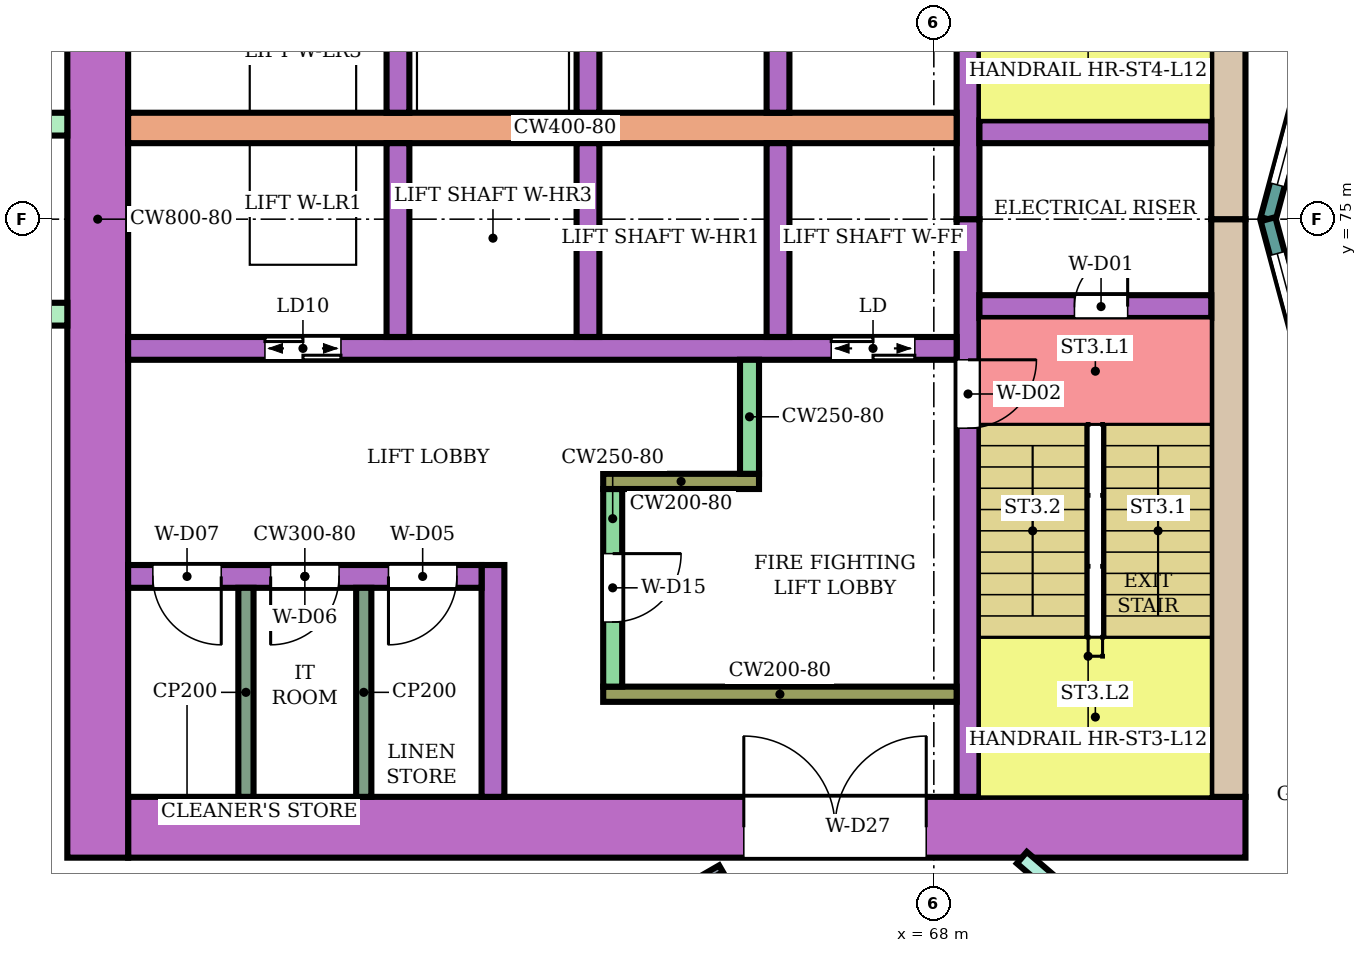
"""IFC4 building model, lengths in metres.
Left out: names, types, materials, properties, quantities, classifications, styles, units other than length and angle.
Written with IfcOpenShell. Run it as: python <this file> out.ifc"""

import sys

from ifc_helpers import new_model, si_unit, direction, frame, frame_2d, origin, place, context, subcontext, project, spatial, rectangle, extrude, element, fill, save


model = new_model("IFC4")
c1 = context("Model", 3, precision=1e-05, world=origin(), true_north=direction((0.0, 1.0)))
c2 = subcontext(c1, "Body", "Model", "MODEL_VIEW")
j1 = project(units=[si_unit("LENGTHUNIT", "METRE"), si_unit("PLANEANGLEUNIT", "RADIAN")], contexts=[c1])
p1 = place(None, origin())
s1 = spatial("IfcSite", under=j1, at=p1, CompositionType="ELEMENT")
p2 = place(p1, origin())
s2 = spatial("IfcBuilding", under=s1, at=p2, CompositionType="ELEMENT")
p3 = place(p2, frame((0.0, 0.0, 55.4)))
s3 = spatial("IfcBuildingStorey", under=s2, at=p3, CompositionType="ELEMENT", Elevation=55.4)
p4 = place(p3, frame((72.1, 67.0, 0.0), z_axis=(0.0, 0.0, 1.0), x_axis=(-1.0, 0.0, 0.0)))
e1 = element("IfcWall", 1, at=p4, inside=s3, PredefinedType="SHEAR", context=c2, shape_type="SweptSolid", body=[
    extrude(rectangle(XDim=14.7, YDim=0.8, at=frame_2d((7.35, 0.0))), origin(), (0.0, 0.0, 1.0), 3.48),
])
p5 = place(p4, frame((4.2, 0.0, 0.0)))
e2 = element("IfcOpeningElement", 2, at=p5, cuts=e1, PredefinedType="OPENING", context=c2, shape_type="SweptSolid", body=[
    extrude(rectangle(XDim=2.4, YDim=2.4, at=frame_2d((1.2, 1.2))), frame((0.0, 0.41, 0.0), z_axis=(0.0, -1.0, 0.0), x_axis=(1.0, 0.0, 0.0)), (0.0, 0.0, 1.0), 0.82),
])
for number, where, z_axis, x_axis in (
    (3, (71.875, 75.0, 0.0), (0.0, 0.0, 1.0), (0.0, -1.0, 0.0)),
    (4, (71.875, 82.6, 0.0), (0.0, 0.0, 1.0), (0.0, -1.0, 0.0)),
):
    element("IfcWall", number, at=place(p3, frame(where, z_axis=z_axis, x_axis=x_axis)), inside=s3, PredefinedType="SHEAR", context=c2, shape_type="SweptSolid", body=[
        extrude(rectangle(XDim=7.6, YDim=0.45, at=frame_2d((3.8, 0.0))), origin(), (0.0, 0.0, 1.0), 3.48),
    ])
p6 = place(p3, frame((57.0, 83.4, 0.0), z_axis=(0.0, 0.0, 1.0), x_axis=(0.0, -1.0, 0.0)))
e5 = element("IfcWall", 5, at=p6, inside=s3, PredefinedType="SHEAR", context=c2, shape_type="SweptSolid", body=[
    extrude(rectangle(XDim=16.8, YDim=0.8, at=frame_2d((8.4, 0.0))), origin(), (0.0, 0.0, 1.0), 3.48),
])
p7 = place(p3, frame((68.45, 75.0, 0.0), z_axis=(0.0, 0.0, 1.0), x_axis=(0.0, -1.0, 0.0)))
e6 = element("IfcWall", 6, at=p7, inside=s3, PredefinedType="SHEAR", context=c2, shape_type="SweptSolid", body=[
    extrude(rectangle(XDim=7.6, YDim=0.3, at=frame_2d((3.8, 0.0))), origin(), (0.0, 0.0, 1.0), 3.48),
])
p8 = place(p7, frame((1.85, 0.0, 0.0)))
e7 = element("IfcOpeningElement", 7, at=p8, cuts=e6, PredefinedType="OPENING", context=c2, shape_type="SweptSolid", body=[
    extrude(rectangle(XDim=0.9, YDim=2.1, at=frame_2d((0.45, 1.05))), frame((0.0, 0.16, 0.0), z_axis=(0.0, -1.0, 0.0), x_axis=(1.0, 0.0, 0.0)), (0.0, 0.0, 1.0), 0.32),
])
p9 = place(p3, frame((68.45, 82.6, 0.0), z_axis=(0.0, 0.0, 1.0), x_axis=(0.0, -1.0, 0.0)))
e8 = element("IfcWall", 8, at=p9, inside=s3, PredefinedType="SHEAR", context=c2, shape_type="SweptSolid", body=[
    extrude(rectangle(XDim=7.6, YDim=0.3, at=frame_2d((3.8, 0.0))), origin(), (0.0, 0.0, 1.0), 3.48),
])
p10 = place(p9, frame((0.25, 0.0, 0.0)))
e9 = element("IfcOpeningElement", 9, at=p10, cuts=e8, PredefinedType="OPENING", context=c2, shape_type="SweptSolid", body=[
    extrude(rectangle(XDim=0.9, YDim=2.1, at=frame_2d((0.45, 1.05))), frame((0.0, 0.16, 0.0), z_axis=(0.0, -1.0, 0.0), x_axis=(1.0, 0.0, 0.0)), (0.0, 0.0, 1.0), 0.32),
])
p11 = place(p3, frame((71.65, 73.85, 0.0), z_axis=(0.0, 0.0, 1.0), x_axis=(-1.0, 0.0, 0.0)))
e10 = element("IfcWall", 10, at=p11, inside=s3, PredefinedType="SHEAR", context=c2, shape_type="SweptSolid", body=[
    extrude(rectangle(XDim=3.05, YDim=0.3, at=frame_2d((1.525, 0.0))), origin(), (0.0, 0.0, 1.0), 3.48),
])
p12 = place(p11, frame((1.1, 0.0, 0.0)))
e11 = element("IfcOpeningElement", 11, at=p12, cuts=e10, PredefinedType="OPENING", context=c2, shape_type="SweptSolid", body=[
    extrude(rectangle(XDim=0.7, YDim=2.0, at=frame_2d((0.35, 1.0))), frame((0.0, 0.16, 0.0), z_axis=(0.0, -1.0, 0.0), x_axis=(1.0, 0.0, 0.0)), (0.0, 0.0, 1.0), 0.32),
])
p13 = place(p3, frame((71.65, 76.15, 0.0), z_axis=(0.0, 0.0, 1.0), x_axis=(-1.0, 0.0, 0.0)))
e12 = element("IfcWall", 12, at=p13, inside=s3, PredefinedType="SHEAR", context=c2, shape_type="SweptSolid", body=[
    extrude(rectangle(XDim=3.05, YDim=0.3, at=frame_2d((1.525, 0.0))), origin(), (0.0, 0.0, 1.0), 3.48),
])
p14 = place(p3, frame((68.3, 73.3, 0.0), z_axis=(0.0, 0.0, 1.0), x_axis=(-1.0, 0.0, 0.0)))
e13 = element("IfcWall", 13, at=p14, inside=s3, PredefinedType="SHEAR", context=c2, shape_type="SweptSolid", body=[
    extrude(rectangle(XDim=10.9, YDim=0.3, at=frame_2d((5.45, 0.0))), origin(), (0.0, 0.0, 1.0), 3.48),
])
p15 = place(p14, frame((0.55, 0.0, 0.0)))
e14 = element("IfcOpeningElement", 14, at=p15, cuts=e13, PredefinedType="OPENING", context=c2, shape_type="SweptSolid", body=[
    extrude(rectangle(XDim=1.1, YDim=2.1, at=frame_2d((0.55, 1.05))), frame((0.0, 0.16, 0.0), z_axis=(0.0, -1.0, 0.0), x_axis=(1.0, 0.0, 0.0)), (0.0, 0.0, 1.0), 0.32),
])
p16 = place(p14, frame((8.1, 0.0, 0.0)))
e15 = element("IfcOpeningElement", 15, at=p16, cuts=e13, PredefinedType="OPENING", context=c2, shape_type="SweptSolid", body=[
    extrude(rectangle(XDim=1.0, YDim=2.1, at=frame_2d((0.5, 1.05))), frame((0.0, 0.16, 0.0), z_axis=(0.0, -1.0, 0.0), x_axis=(1.0, 0.0, 0.0)), (0.0, 0.0, 1.0), 0.32),
])
p17 = place(p3, frame((68.3, 76.2, 0.0), z_axis=(0.0, 0.0, 1.0), x_axis=(-1.0, 0.0, 0.0)))
e16 = element("IfcWall", 16, at=p17, inside=s3, PredefinedType="SHEAR", context=c2, shape_type="SweptSolid", body=[
    extrude(rectangle(XDim=10.9, YDim=0.4, at=frame_2d((5.45, 0.0))), origin(), (0.0, 0.0, 1.0), 3.48),
])
for number, where, z_axis, x_axis in (
    (17, (65.95, 76.0, 0.0), (0.0, 0.0, 1.0), (0.0, -1.0, 0.0)),
    (18, (63.45, 76.0, 0.0), (0.0, 0.0, 1.0), (0.0, -1.0, 0.0)),
    (19, (60.95, 76.0, 0.0), (0.0, 0.0, 1.0), (0.0, -1.0, 0.0)),
    (20, (65.95, 78.95, 0.0), (0.0, 0.0, 1.0), (0.0, -1.0, 0.0)),
    (21, (63.45, 78.95, 0.0), (0.0, 0.0, 1.0), (0.0, -1.0, 0.0)),
    (22, (60.95, 78.95, 0.0), (0.0, 0.0, 1.0), (0.0, -1.0, 0.0)),
):
    element("IfcWall", number, at=place(p3, frame(where, z_axis=z_axis, x_axis=x_axis)), inside=s3, PredefinedType="SHEAR", context=c2, shape_type="SweptSolid", body=[
        extrude(rectangle(XDim=2.55, YDim=0.3, at=frame_2d((1.275, 0.0))), origin(), (0.0, 0.0, 1.0), 3.48),
    ])
p18 = place(p3, frame((68.3, 68.75, 0.0), z_axis=(0.0, 0.0, 1.0), x_axis=(-1.0, 0.0, 0.0)))
e23 = element("IfcWall", 23, at=p18, inside=s3, PredefinedType="SHEAR", context=c2, shape_type="SweptSolid", body=[
    extrude(rectangle(XDim=4.65, YDim=0.2, at=frame_2d((2.325, 0.0))), origin(), (0.0, 0.0, 1.0), 3.48),
])
p19 = place(p3, frame((63.775, 71.45, 0.0), z_axis=(0.0, 0.0, 1.0), x_axis=(0.0, -1.0, 0.0)))
e24 = element("IfcWall", 24, at=p19, inside=s3, PredefinedType="SHEAR", context=c2, shape_type="SweptSolid", body=[
    extrude(rectangle(XDim=2.6, YDim=0.25, at=frame_2d((1.3, 0.0))), origin(), (0.0, 0.0, 1.0), 3.48),
])
p20 = place(p19, frame((0.85, 0.0, 0.0)))
e25 = element("IfcOpeningElement", 25, at=p20, cuts=e24, PredefinedType="OPENING", context=c2, shape_type="SweptSolid", body=[
    extrude(rectangle(XDim=0.9, YDim=2.1, at=frame_2d((0.45, 1.05))), frame((0.0, 0.135, 0.0), z_axis=(0.0, -1.0, 0.0), x_axis=(1.0, 0.0, 0.0)), (0.0, 0.0, 1.0), 0.27),
])
p21 = place(p3, frame((65.7, 71.55, 0.0), z_axis=(0.0, 0.0, 1.0), x_axis=(-1.0, 0.0, 0.0)))
e26 = element("IfcWall", 26, at=p21, inside=s3, PredefinedType="SHEAR", context=c2, shape_type="SweptSolid", body=[
    extrude(rectangle(XDim=2.05, YDim=0.2, at=frame_2d((1.025, 0.0))), origin(), (0.0, 0.0, 1.0), 3.48),
])
p22 = place(p3, frame((65.575, 73.15, 0.0), z_axis=(0.0, 0.0, 1.0), x_axis=(0.0, -1.0, 0.0)))
e27 = element("IfcWall", 27, at=p22, inside=s3, PredefinedType="SHEAR", context=c2, shape_type="SweptSolid", body=[
    extrude(rectangle(XDim=1.5, YDim=0.25, at=frame_2d((0.75, 0.0))), origin(), (0.0, 0.0, 1.0), 3.48),
])
p23 = place(p3, frame((62.2, 70.45, 0.0), z_axis=(0.0, 0.0, 1.0), x_axis=(0.0, -1.0, 0.0)))
e28 = element("IfcWall", 28, at=p23, inside=s3, PredefinedType="SHEAR", context=c2, shape_type="SweptSolid", body=[
    extrude(rectangle(XDim=3.05, YDim=0.3, at=frame_2d((1.525, 0.0))), origin(), (0.0, 0.0, 1.0), 3.48),
])
p24 = place(p3, frame((62.05, 70.3, 0.0), z_axis=(0.0, 0.0, 1.0), x_axis=(-1.0, 0.0, 0.0)))
e29 = element("IfcWall", 29, at=p24, inside=s3, PredefinedType="SHEAR", context=c2, shape_type="SweptSolid", body=[
    extrude(rectangle(XDim=4.65, YDim=0.3, at=frame_2d((2.325, 0.0))), origin(), (0.0, 0.0, 1.0), 3.48),
])
p25 = place(p24, frame((0.325, 0.0, 0.0)))
e30 = element("IfcOpeningElement", 30, at=p25, cuts=e29, PredefinedType="OPENING", context=c2, shape_type="SweptSolid", body=[
    extrude(rectangle(XDim=0.9, YDim=2.1, at=frame_2d((0.45, 1.05))), frame((0.0, 0.16, 0.0), z_axis=(0.0, -1.0, 0.0), x_axis=(1.0, 0.0, 0.0)), (0.0, 0.0, 1.0), 0.32),
])
p26 = place(p24, frame((1.875, 0.0, 0.0)))
e31 = element("IfcOpeningElement", 31, at=p26, cuts=e29, PredefinedType="OPENING", context=c2, shape_type="SweptSolid", body=[
    extrude(rectangle(XDim=0.9, YDim=2.1, at=frame_2d((0.45, 1.05))), frame((0.0, 0.16, 0.0), z_axis=(0.0, -1.0, 0.0), x_axis=(1.0, 0.0, 0.0)), (0.0, 0.0, 1.0), 0.32),
])
p27 = place(p24, frame((3.425, 0.0, 0.0)))
e32 = element("IfcOpeningElement", 32, at=p27, cuts=e29, PredefinedType="OPENING", context=c2, shape_type="SweptSolid", body=[
    extrude(rectangle(XDim=0.9, YDim=2.1, at=frame_2d((0.45, 1.05))), frame((0.0, 0.16, 0.0), z_axis=(0.0, -1.0, 0.0), x_axis=(1.0, 0.0, 0.0)), (0.0, 0.0, 1.0), 0.32),
])
for number, where, z_axis, x_axis in (
    (33, (56.6, 76.25, 0.0), (0.0, 0.0, 1.0), (-1.0, 0.0, 0.0)),
    (34, (56.6, 73.75, 0.0), (0.0, 0.0, 1.0), (-1.0, 0.0, 0.0)),
):
    element("IfcWall", number, at=place(p3, frame(where, z_axis=z_axis, x_axis=x_axis)), inside=s3, PredefinedType="NOTDEFINED", context=c2, shape_type="SweptSolid", body=[
        extrude(rectangle(XDim=2.416, YDim=0.3, at=frame_2d((1.208, 0.0))), origin(), (0.0, 0.0, 1.0), 3.8),
    ])
p28 = place(p3, frame((73.415, 78.802, 0.0), z_axis=(0.0, 0.0, 1.0), x_axis=(-0.258789828301, -0.965933654434, 0.0)))
e35 = element("IfcWall", 35, at=p28, inside=s3, PredefinedType="NOTDEFINED", context=c2, shape_type="SweptSolid", body=[
    extrude(rectangle(XDim=3.936, YDim=0.2, at=frame_2d((1.968, 0.0))), origin(), (0.0, 0.0, 1.0), 3.8),
])
p29 = place(p28, frame((0.468, 0.0, 0.9)))
e36 = element("IfcOpeningElement", 36, at=p29, cuts=e35, PredefinedType="OPENING", context=c2, shape_type="SweptSolid", body=[
    extrude(rectangle(XDim=3.0, YDim=2.3, at=frame_2d((1.5, 1.15))), frame((0.0, 0.11, 0.0), z_axis=(0.0, -1.0, 0.0), x_axis=(1.0, 0.0, 0.0)), (0.0, 0.0, 1.0), 0.22),
])
p30 = place(p3, frame((72.396, 75.0, 0.0), z_axis=(0.0, 0.0, 1.0), x_axis=(0.258789828301, -0.965933654434, 0.0)))
e37 = element("IfcWall", 37, at=p30, inside=s3, PredefinedType="NOTDEFINED", context=c2, shape_type="SweptSolid", body=[
    extrude(rectangle(XDim=3.936, YDim=0.2, at=frame_2d((1.968, 0.0))), origin(), (0.0, 0.0, 1.0), 3.8),
])
p31 = place(p30, frame((0.468, 0.0, 0.9)))
e38 = element("IfcOpeningElement", 38, at=p31, cuts=e37, PredefinedType="OPENING", context=c2, shape_type="SweptSolid", body=[
    extrude(rectangle(XDim=3.0, YDim=2.3, at=frame_2d((1.5, 1.15))), frame((0.0, 0.11, 0.0), z_axis=(0.0, -1.0, 0.0), x_axis=(1.0, 0.0, 0.0)), (0.0, 0.0, 1.0), 0.22),
])
p32 = place(p3, frame((69.158, 66.6, 0.0), z_axis=(0.0, 0.0, 1.0), x_axis=(0.757976058094, -0.652282373943, 0.0)))
e39 = element("IfcWall", 39, at=p32, inside=s3, PredefinedType="PARTITIONING", context=c2, shape_type="SweptSolid", body=[
    extrude(rectangle(XDim=5.16, YDim=0.2, at=frame_2d((2.58, 0.0))), origin(), (0.0, 0.0, 1.0), 3.35),
])
p33 = place(p32, frame((1.6, 0.0, 0.0)))
e40 = element("IfcOpeningElement", 40, at=p33, cuts=e39, PredefinedType="OPENING", context=c2, shape_type="SweptSolid", body=[
    extrude(rectangle(XDim=1.0, YDim=2.1, at=frame_2d((0.5, 1.05))), frame((0.0, 0.11, 0.0), z_axis=(0.0, -1.0, 0.0), x_axis=(1.0, 0.0, 0.0)), (0.0, 0.0, 1.0), 0.22),
])
p34 = place(p3, frame((57.659, 62.101, 0.0), z_axis=(0.0, 0.0, 1.0), x_axis=(0.86602264145, 0.500004784474, 0.0)))
e41 = element("IfcWall", 41, at=p34, inside=s3, PredefinedType="PARTITIONING", context=c2, shape_type="SweptSolid", body=[
    extrude(rectangle(XDim=8.708, YDim=0.1, at=frame_2d((4.354, 0.0))), origin(), (0.0, 0.0, 1.0), 3.35),
])
p35 = place(p34, frame((3.929, 0.0, 0.0)))
e42 = element("IfcOpeningElement", 42, at=p35, cuts=e41, PredefinedType="OPENING", context=c2, shape_type="SweptSolid", body=[
    extrude(rectangle(XDim=0.9, YDim=2.1, at=frame_2d((0.45, 1.05))), frame((0.0, 0.06, 0.0), z_axis=(0.0, -1.0, 0.0), x_axis=(1.0, 0.0, 0.0)), (0.0, 0.0, 1.0), 0.12),
])
p36 = place(p3, frame((71.596, 64.635, 0.0), z_axis=(0.0, 0.0, 1.0), x_axis=(0.652285007511, 0.757973791748, 0.0)))
e43 = element("IfcWall", 43, at=p36, inside=s3, PredefinedType="PARTITIONING", context=c2, shape_type="SweptSolid", body=[
    extrude(rectangle(XDim=2.65, YDim=0.1, at=frame_2d((1.325, 0.0))), origin(), (0.0, 0.0, 1.0), 3.35),
])
p37 = place(p36, frame((0.6, 0.0, 0.0)))
e44 = element("IfcOpeningElement", 44, at=p37, cuts=e43, PredefinedType="OPENING", context=c2, shape_type="SweptSolid", body=[
    extrude(rectangle(XDim=0.8, YDim=2.1, at=frame_2d((0.4, 1.05))), frame((0.0, 0.06, 0.0), z_axis=(0.0, -1.0, 0.0), x_axis=(1.0, 0.0, 0.0)), (0.0, 0.0, 1.0), 0.12),
])
for number, where, z_axis, x_axis in (
    (45, (60.5, 70.15, 0.0), (0.0, 0.0, 1.0), (0.0, -1.0, 0.0)),
    (46, (58.95, 70.15, 0.0), (0.0, 0.0, 1.0), (0.0, -1.0, 0.0)),
):
    element("IfcWall", number, at=place(p3, frame(where, z_axis=z_axis, x_axis=x_axis)), inside=s3, PredefinedType="PARTITIONING", context=c2, shape_type="SweptSolid", body=[
        extrude(rectangle(XDim=2.75, YDim=0.2, at=frame_2d((1.375, 0.0))), origin(), (0.0, 0.0, 1.0), 3.48),
    ])
p38 = place(p29, origin())
e47 = element("IfcWindow", 47, at=p38, inside=s3, PartitioningType="SINGLE_PANEL", PredefinedType="WINDOW", context=c2, shape_type="SweptSolid", body=[
    extrude(rectangle(XDim=3.0, YDim=2.3, at=frame_2d((1.5, 1.15))), frame((0.0, 0.03, 0.0), z_axis=(0.0, -1.0, 0.0), x_axis=(1.0, 0.0, 0.0)), (0.0, 0.0, 1.0), 0.06),
])
fill(e36, e47)
p39 = place(p31, origin())
e48 = element("IfcWindow", 48, at=p39, inside=s3, PartitioningType="SINGLE_PANEL", PredefinedType="WINDOW", context=c2, shape_type="SweptSolid", body=[
    extrude(rectangle(XDim=3.0, YDim=2.3, at=frame_2d((1.5, 1.15))), frame((0.0, 0.03, 0.0), z_axis=(0.0, -1.0, 0.0), x_axis=(1.0, 0.0, 0.0)), (0.0, 0.0, 1.0), 0.06),
])
fill(e38, e48)
p40 = place(p12, frame((0.7, 0.0, 0.0), z_axis=(0.0, 0.0, 1.0), x_axis=(-1.0, 0.0, 0.0)))
e49 = element("IfcDoor", 49, at=p40, inside=s3, OperationType="SINGLE_SWING_RIGHT", PredefinedType="DOOR", context=c2, shape_type="SweptSolid", body=[
    extrude(rectangle(XDim=0.7, YDim=2.0, at=frame_2d((0.35, 1.0))), frame((0.0, 0.025, 0.0), z_axis=(0.0, -1.0, 0.0), x_axis=(1.0, 0.0, 0.0)), (0.0, 0.0, 1.0), 0.05),
])
fill(e11, e49)
p41 = place(p8, origin())
e50 = element("IfcDoor", 50, at=p41, inside=s3, OperationType="SINGLE_SWING_LEFT", PredefinedType="DOOR", context=c2, shape_type="SweptSolid", body=[
    extrude(rectangle(XDim=0.9, YDim=2.1, at=frame_2d((0.45, 1.05))), frame((0.0, 0.025, 0.0), z_axis=(0.0, -1.0, 0.0), x_axis=(1.0, 0.0, 0.0)), (0.0, 0.0, 1.0), 0.05),
])
fill(e7, e50)
p42 = place(p15, origin())
e51 = element("IfcDoor", 51, at=p42, inside=s3, OperationType="DOUBLE_DOOR_SLIDING", PredefinedType="DOOR", context=c2, shape_type="SweptSolid", body=[
    extrude(rectangle(XDim=1.1, YDim=2.1, at=frame_2d((0.55, 1.05))), frame((0.0, 0.025, 0.0), z_axis=(0.0, -1.0, 0.0), x_axis=(1.0, 0.0, 0.0)), (0.0, 0.0, 1.0), 0.05),
])
fill(e14, e51)
p43 = place(p16, origin())
e52 = element("IfcDoor", 52, at=p43, inside=s3, OperationType="DOUBLE_DOOR_SLIDING", PredefinedType="DOOR", context=c2, shape_type="SweptSolid", body=[
    extrude(rectangle(XDim=1.0, YDim=2.1, at=frame_2d((0.5, 1.05))), frame((0.0, 0.025, 0.0), z_axis=(0.0, -1.0, 0.0), x_axis=(1.0, 0.0, 0.0)), (0.0, 0.0, 1.0), 0.05),
])
fill(e15, e52)
p44 = place(p20, origin())
e53 = element("IfcDoor", 53, at=p44, inside=s3, OperationType="SINGLE_SWING_LEFT", PredefinedType="DOOR", context=c2, shape_type="SweptSolid", body=[
    extrude(rectangle(XDim=0.9, YDim=2.1, at=frame_2d((0.45, 1.05))), frame((0.0, 0.025, 0.0), z_axis=(0.0, -1.0, 0.0), x_axis=(1.0, 0.0, 0.0)), (0.0, 0.0, 1.0), 0.05),
])
fill(e25, e53)
p45 = place(p25, origin())
e54 = element("IfcDoor", 54, at=p45, inside=s3, OperationType="SINGLE_SWING_RIGHT", PredefinedType="DOOR", context=c2, shape_type="SweptSolid", body=[
    extrude(rectangle(XDim=0.9, YDim=2.1, at=frame_2d((0.45, 1.05))), frame((0.0, 0.025, 0.0), z_axis=(0.0, -1.0, 0.0), x_axis=(1.0, 0.0, 0.0)), (0.0, 0.0, 1.0), 0.05),
])
fill(e30, e54)
p46 = place(p26, origin())
e55 = element("IfcDoor", 55, at=p46, inside=s3, OperationType="SINGLE_SWING_RIGHT", PredefinedType="DOOR", context=c2, shape_type="SweptSolid", body=[
    extrude(rectangle(XDim=0.9, YDim=2.1, at=frame_2d((0.45, 1.05))), frame((0.0, 0.025, 0.0), z_axis=(0.0, -1.0, 0.0), x_axis=(1.0, 0.0, 0.0)), (0.0, 0.0, 1.0), 0.05),
])
fill(e31, e55)
p47 = place(p27, origin())
e56 = element("IfcDoor", 56, at=p47, inside=s3, OperationType="SINGLE_SWING_LEFT", PredefinedType="DOOR", context=c2, shape_type="SweptSolid", body=[
    extrude(rectangle(XDim=0.9, YDim=2.1, at=frame_2d((0.45, 1.05))), frame((0.0, 0.025, 0.0), z_axis=(0.0, -1.0, 0.0), x_axis=(1.0, 0.0, 0.0)), (0.0, 0.0, 1.0), 0.05),
])
fill(e32, e56)
p48 = place(p5, frame((2.4, 0.0, 0.0), z_axis=(0.0, 0.0, 1.0), x_axis=(-1.0, 0.0, 0.0)))
e57 = element("IfcDoor", 57, at=p48, inside=s3, OperationType="DOUBLE_DOOR_SINGLE_SWING", PredefinedType="DOOR", context=c2, shape_type="SweptSolid", body=[
    extrude(rectangle(XDim=2.4, YDim=2.4, at=frame_2d((1.2, 1.2))), frame((0.0, 0.025, 0.0), z_axis=(0.0, -1.0, 0.0), x_axis=(1.0, 0.0, 0.0)), (0.0, 0.0, 1.0), 0.05),
])
fill(e2, e57)
save(model, sys.argv[1])
